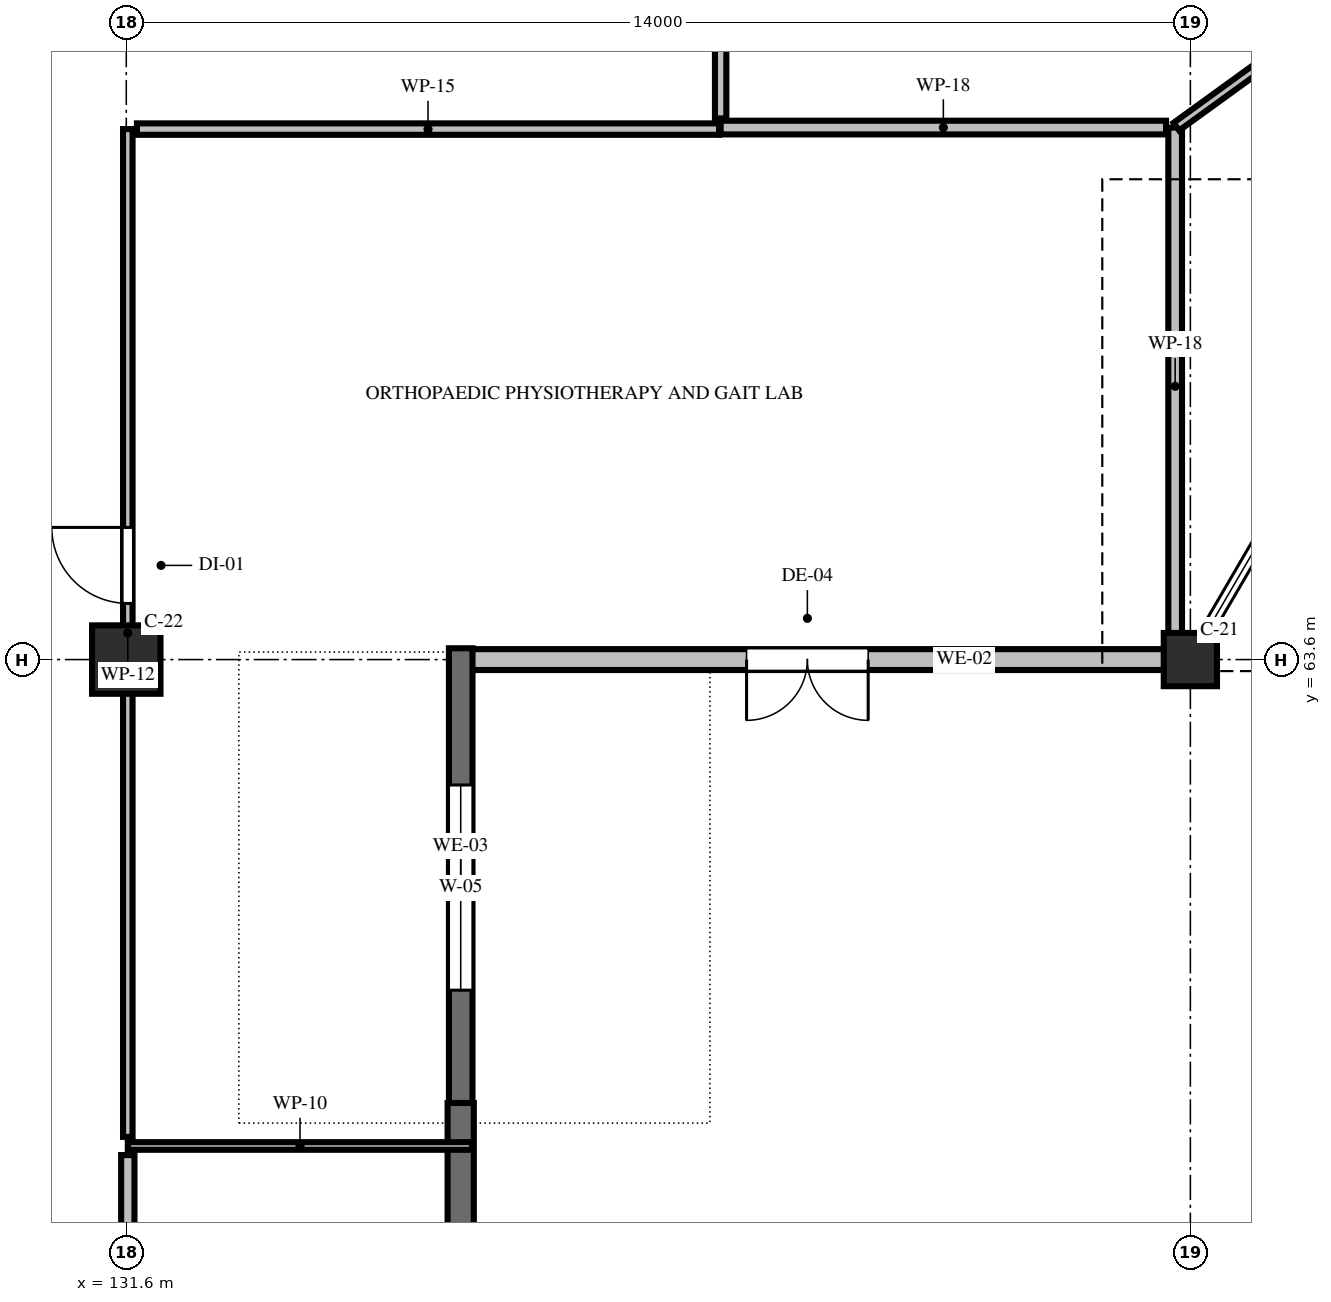
"""IFC4 building model, lengths in metres.
Left out: names, types, materials, properties, quantities, classifications, styles, units other than length and angle.
Written with IfcOpenShell. Run it as: python <this file> out.ifc"""

import sys

from ifc_helpers import new_model, si_unit, direction, frame, frame_2d, origin, origin_2d, place, context, subcontext, project, spatial, rectangle, hollow_rectangle, extrude, element, fill, save


model = new_model("IFC4")
c1 = context("Model", 3, precision=1e-05, world=origin(), true_north=direction((0.0, 1.0)))
c2 = subcontext(c1, "Body", "Model", "MODEL_VIEW")
j1 = project(units=[si_unit("LENGTHUNIT", "METRE"), si_unit("PLANEANGLEUNIT", "RADIAN")], contexts=[c1])
p1 = place(None, origin())
s1 = spatial("IfcSite", under=j1, at=p1, CompositionType="ELEMENT")
p2 = place(p1, origin())
s2 = spatial("IfcBuilding", under=s1, at=p2, CompositionType="ELEMENT")
p3 = place(p2, origin())
s3 = spatial("IfcBuildingStorey", under=s2, at=p3, CompositionType="ELEMENT", Elevation=0.0)
p4 = place(p3, frame((131.6, 63.6, 0.0), z_axis=(0.0, 0.0, 1.0), x_axis=(1.0, 0.0, 0.0)))
e1 = element("IfcColumn", 1, at=p4, inside=s3, PredefinedType="COLUMN", context=c2, shape_type="SweptSolid", body=[
    extrude(hollow_rectangle(XDim=0.9, YDim=0.9, WallThickness=0.036, InnerFilletRadius=0.036, OuterFilletRadius=0.072, at=origin_2d()), origin(), (0.0, 0.0, 1.0), 5.4),
])
p5 = place(p3, frame((145.6, 63.6, 0.0), z_axis=(0.0, 0.0, 1.0), x_axis=(1.0, 0.0, 0.0)))
e2 = element("IfcColumn", 2, at=p5, inside=s3, PredefinedType="COLUMN", context=c2, shape_type="SweptSolid", body=[
    extrude(hollow_rectangle(XDim=0.7, YDim=0.7, WallThickness=0.028, InnerFilletRadius=0.028, OuterFilletRadius=0.056, at=origin_2d()), origin(), (0.0, 0.0, 1.0), 5.4),
])
p6 = place(p3, frame((145.254, 63.6, 0.0), z_axis=(0.0, 0.0, 1.0), x_axis=(-1.0, 0.0, 0.0)))
e3 = element("IfcWall", 3, at=p6, inside=s3, PredefinedType="SOLIDWALL", context=c2, shape_type="SweptSolid", body=[
    extrude(rectangle(XDim=9.386, YDim=0.275, at=frame_2d((4.693, 0.0))), origin(), (0.0, 0.0, 1.0), 3.468),
])
p7 = place(p6, frame((3.893, 0.0, 0.0)))
e4 = element("IfcOpeningElement", 4, at=p7, cuts=e3, PredefinedType="OPENING", context=c2, shape_type="SweptSolid", body=[
    extrude(rectangle(XDim=1.6, YDim=2.2, at=frame_2d((0.8, 1.1))), frame((0.0, 0.147, 0.0), z_axis=(0.0, -1.0, 0.0), x_axis=(1.0, 0.0, 0.0)), (0.0, 0.0, 1.0), 0.295),
])
p8 = place(p3, frame((136.0, 63.749, 0.0), z_axis=(0.0, 0.0, 1.0), x_axis=(0.0, -1.0, 0.0)))
e5 = element("IfcWall", 5, at=p8, inside=s3, PredefinedType="SOLIDWALL", context=c2, shape_type="SweptSolid", body=[
    extrude(rectangle(XDim=6.298, YDim=0.31, at=frame_2d((3.149, 0.0))), origin(), (0.0, 0.0, 1.0), 3.468),
])
p9 = place(p8, frame((1.799, 0.0, 0.9)))
e6 = element("IfcOpeningElement", 6, at=p9, cuts=e5, PredefinedType="OPENING", context=c2, shape_type="SweptSolid", body=[
    extrude(rectangle(XDim=2.7, YDim=2.0, at=frame_2d((1.35, 1.0))), frame((0.0, 0.165, 0.0), z_axis=(0.0, -1.0, 0.0), x_axis=(1.0, 0.0, 0.0)), (0.0, 0.0, 1.0), 0.33),
])
p10 = place(p3, frame((136.0, 57.766, 0.0), z_axis=(0.0, 0.0, 1.0), x_axis=(0.0, -1.0, 0.0)))
e7 = element("IfcWall", 7, at=p10, inside=s3, PredefinedType="SOLIDWALL", context=c2, shape_type="SweptSolid", body=[
    extrude(rectangle(XDim=6.331, YDim=0.345, at=frame_2d((3.166, 0.0))), origin(), (0.0, 0.0, 1.0), 3.468),
])
p11 = place(p10, frame((1.666, 0.0, 0.9)))
e8 = element("IfcOpeningElement", 8, at=p11, cuts=e7, PredefinedType="OPENING", context=c2, shape_type="SweptSolid", body=[
    extrude(rectangle(XDim=3.0, YDim=1.4, at=frame_2d((1.5, 0.7))), frame((0.0, 0.182, 0.0), z_axis=(0.0, -1.0, 0.0), x_axis=(1.0, 0.0, 0.0)), (0.0, 0.0, 1.0), 0.365),
])
p12 = place(p3, frame((145.4, 70.6, 0.0), z_axis=(0.0, 0.0, 1.0), x_axis=(0.0, -1.0, 0.0)))
e9 = element("IfcWall", 9, at=p12, inside=s3, PredefinedType="PARTITIONING", context=c2, shape_type="SweptSolid", body=[
    extrude(rectangle(XDim=6.808, YDim=0.18, at=frame_2d((3.404, 0.0))), origin(), (0.0, 0.0, 1.0), 3.47),
])
p13 = place(p3, frame((136.152, 57.2, 0.0), z_axis=(0.0, 0.0, 1.0), x_axis=(-1.0, 0.0, 0.0)))
e10 = element("IfcWall", 10, at=p13, inside=s3, PredefinedType="PARTITIONING", context=c2, shape_type="SweptSolid", body=[
    extrude(rectangle(XDim=4.531, YDim=0.1, at=frame_2d((2.266, 0.0))), origin(), (0.0, 0.0, 1.0), 4.37),
])
p14 = place(p3, frame((131.62, 57.32, 0.0), z_axis=(0.0, 0.0, 1.0), x_axis=(0.0, 1.0, 0.0)))
e11 = element("IfcWall", 11, at=p14, inside=s3, PredefinedType="PARTITIONING", context=c2, shape_type="SweptSolid", body=[
    extrude(rectangle(XDim=13.26, YDim=0.125, at=frame_2d((6.63, 0.0))), origin(), (0.0, 0.0, 1.0), 3.47),
])
p15 = place(p14, frame((7.019, 0.0, 0.0)))
e12 = element("IfcOpeningElement", 12, at=p15, cuts=e11, PredefinedType="OPENING", context=c2, shape_type="SweptSolid", body=[
    extrude(rectangle(XDim=1.0, YDim=2.15, at=frame_2d((0.5, 1.075))), frame((0.0, 0.073, 0.0), z_axis=(0.0, -1.0, 0.0), x_axis=(1.0, 0.0, 0.0)), (0.0, 0.0, 1.0), 0.145),
])
p16 = place(p3, frame((131.74, 70.58, 0.0), z_axis=(0.0, 0.0, 1.0), x_axis=(1.0, 0.0, 0.0)))
e13 = element("IfcWall", 13, at=p16, inside=s3, PredefinedType="PARTITIONING", context=c2, shape_type="SweptSolid", body=[
    extrude(rectangle(XDim=7.66, YDim=0.15, at=frame_2d((3.83, 0.0))), origin(), (0.0, 0.0, 1.0), 4.98),
])
p17 = place(p3, frame((139.42, 70.6, 0.0), z_axis=(0.0, 0.0, 1.0), x_axis=(1.0, 0.0, 0.0)))
e14 = element("IfcWall", 14, at=p17, inside=s3, PredefinedType="PARTITIONING", context=c2, shape_type="SweptSolid", body=[
    extrude(rectangle(XDim=5.86, YDim=0.18, at=frame_2d((2.93, 0.0))), origin(), (0.0, 0.0, 1.0), 4.98),
])
p18 = place(p3, frame((150.271, 74.13, 0.0), z_axis=(0.0, 0.0, 1.0), x_axis=(-0.80978068366, -0.586732685617, 0.0)))
e15 = element("IfcWall", 15, at=p18, inside=s3, PredefinedType="PARTITIONING", context=c2, shape_type="SweptSolid", body=[
    extrude(rectangle(XDim=5.996, YDim=0.125, at=frame_2d((2.998, 0.0))), origin(), (0.0, 0.0, 1.0), 4.278),
])
p19 = place(p3, frame((139.42, 70.72, 0.0), z_axis=(0.0, 0.0, 1.0), x_axis=(0.0, 1.0, 0.0)))
e16 = element("IfcWall", 16, at=p19, inside=s3, PredefinedType="PARTITIONING", context=c2, shape_type="SweptSolid", body=[
    extrude(rectangle(XDim=16.78, YDim=0.15, at=frame_2d((8.39, 0.0))), origin(), (0.0, 0.0, 1.0), 4.98),
])
p20 = place(p19, frame((7.59, 0.0, 0.0)))
e17 = element("IfcOpeningElement", 17, at=p20, cuts=e16, PredefinedType="OPENING", context=c2, shape_type="SweptSolid", body=[
    extrude(rectangle(XDim=1.6, YDim=2.2, at=frame_2d((0.8, 1.1))), frame((0.0, 0.085, 0.0), z_axis=(0.0, -1.0, 0.0), x_axis=(1.0, 0.0, 0.0)), (0.0, 0.0, 1.0), 0.17),
])
p21 = place(p3, frame((131.62, 52.052, 0.0), z_axis=(0.0, 0.0, 1.0), x_axis=(0.0, 1.0, 0.0)))
e18 = element("IfcWall", 18, at=p21, inside=s3, PredefinedType="PLUMBINGWALL", context=c2, shape_type="SweptSolid", body=[
    extrude(rectangle(XDim=5.028, YDim=0.175, at=frame_2d((2.514, 0.0))), origin(), (0.0, 0.0, 1.0), 3.47),
])
p22 = place(p21, frame((1.989, 0.0, 0.0)))
e19 = element("IfcOpeningElement", 19, at=p22, cuts=e18, PredefinedType="OPENING", context=c2, shape_type="SweptSolid", body=[
    extrude(rectangle(XDim=1.05, YDim=2.15, at=frame_2d((0.525, 1.075))), frame((0.0, 0.097, 0.0), z_axis=(0.0, -1.0, 0.0), x_axis=(1.0, 0.0, 0.0)), (0.0, 0.0, 1.0), 0.195),
])
p23 = place(p7, origin())
e20 = element("IfcDoor", 20, at=p23, inside=s3, OperationType="DOUBLE_DOOR_SINGLE_SWING", PredefinedType="DOOR", context=c2, shape_type="SweptSolid", body=[
    extrude(rectangle(XDim=1.6, YDim=2.2, at=frame_2d((0.8, 1.1))), frame((0.0, 0.025, 0.0), z_axis=(0.0, -1.0, 0.0), x_axis=(1.0, 0.0, 0.0)), (0.0, 0.0, 1.0), 0.05),
])
fill(e4, e20)
p24 = place(p9, origin())
e21 = element("IfcWindow", 21, at=p24, inside=s3, PartitioningType="TRIPLE_PANEL_VERTICAL", PredefinedType="WINDOW", context=c2, shape_type="SweptSolid", body=[
    extrude(rectangle(XDim=2.7, YDim=2.0, at=frame_2d((1.35, 1.0))), frame((0.0, 0.03, 0.0), z_axis=(0.0, -1.0, 0.0), x_axis=(1.0, 0.0, 0.0)), (0.0, 0.0, 1.0), 0.06),
])
fill(e6, e21)
p25 = place(p15, origin())
e22 = element("IfcDoor", 22, at=p25, inside=s3, OperationType="SINGLE_SWING_RIGHT", PredefinedType="DOOR", context=c2, shape_type="SweptSolid", body=[
    extrude(rectangle(XDim=1.0, YDim=2.15, at=frame_2d((0.5, 1.075))), frame((0.0, 0.025, 0.0), z_axis=(0.0, -1.0, 0.0), x_axis=(1.0, 0.0, 0.0)), (0.0, 0.0, 1.0), 0.05),
])
fill(e12, e22)
save(model, sys.argv[1])
